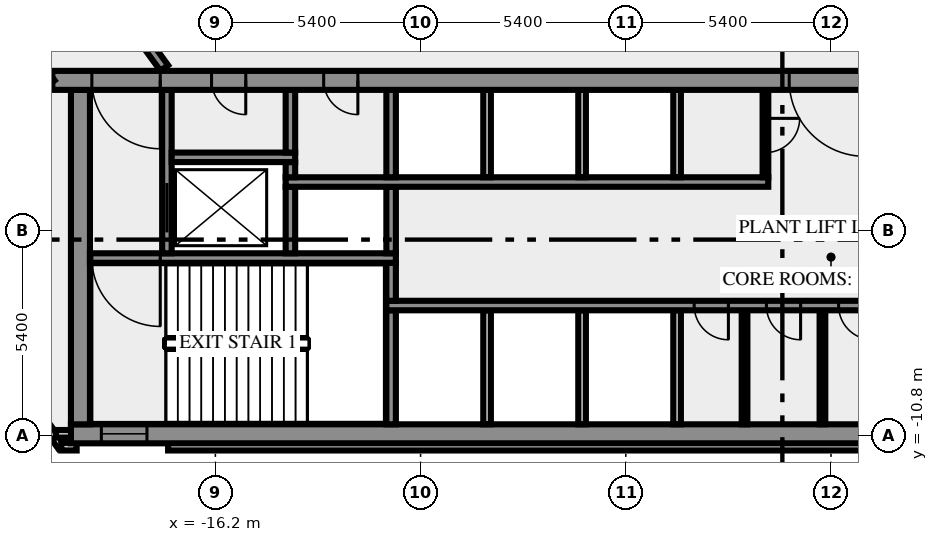
"""IFC4 building model, lengths in metres.
Left out: names, types, materials, properties, quantities, classifications, styles, units other than length and angle.
Written with IfcOpenShell. Run it as: python <this file> out.ifc"""

import sys

from ifc_helpers import new_model, si_unit, direction, frame, frame_2d, origin, place, context, subcontext, project, spatial, rectangle, extrude, element, fill, save


model = new_model("IFC4")
c1 = context("Model", 3, precision=1e-05, world=origin(), true_north=direction((0.0, 1.0)))
c2 = subcontext(c1, "Body", "Model", "MODEL_VIEW")
j1 = project(units=[si_unit("LENGTHUNIT", "METRE"), si_unit("PLANEANGLEUNIT", "RADIAN")], contexts=[c1])
p1 = place(None, origin())
s1 = spatial("IfcSite", under=j1, at=p1, CompositionType="ELEMENT")
p2 = place(p1, origin())
s2 = spatial("IfcBuilding", under=s1, at=p2, CompositionType="ELEMENT")
p3 = place(p2, frame((0.0, 0.0, 25.0)))
s3 = spatial("IfcBuildingStorey", under=s2, at=p3, CompositionType="ELEMENT", Elevation=25.0)
p4 = place(p3, frame((-21.833, -8.909, 0.0), z_axis=(0.0, 0.0, 1.0), x_axis=(0.587766567315, -0.809030569476, 0.0)))
e1 = element("IfcWall", 1, at=p4, inside=s3, PredefinedType="SOLIDWALL", context=c2, shape_type="SweptSolid", body=[
    extrude(rectangle(XDim=2.688, YDim=0.2, at=frame_2d((1.344, 0.0))), origin(), (0.0, 0.0, 1.0), 5.65),
])
p5 = place(p3, frame((-20.256, -11.088, 0.0), z_axis=(0.0, 0.0, 1.0), x_axis=(1.0, 0.0, 0.0)))
e2 = element("IfcWall", 2, at=p5, inside=s3, PredefinedType="SOLIDWALL", context=c2, shape_type="SweptSolid", body=[
    extrude(rectangle(XDim=0.406, YDim=0.2, at=frame_2d((0.203, 0.0))), origin(), (0.0, 0.0, 1.0), 5.65),
])
p6 = place(p3, frame((-17.444, -11.088, 0.0), z_axis=(0.0, 0.0, 1.0), x_axis=(1.0, 0.0, 0.0)))
e3 = element("IfcWall", 3, at=p6, inside=s3, PredefinedType="SOLIDWALL", context=c2, shape_type="SweptSolid", body=[
    extrude(rectangle(XDim=34.888, YDim=0.2, at=frame_2d((17.444, 0.0))), origin(), (0.0, 0.0, 1.0), 5.65),
])
p7 = place(p3, frame((-19.98, -10.75, 0.0), z_axis=(0.0, 0.0, 1.0), x_axis=(-1.0, 0.0, 0.0)))
e4 = element("IfcWall", 4, at=p7, inside=s3, PredefinedType="SOLIDWALL", context=c2, shape_type="SweptSolid", body=[
    extrude(rectangle(XDim=0.417, YDim=0.2, at=frame_2d((0.208, 0.0))), origin(), (0.0, 0.0, 1.0), 5.65),
])
p8 = place(p3, frame((-20.0, -10.75, 0.0), z_axis=(0.0, 0.0, 1.0), x_axis=(1.0, 0.0, 0.0)))
e5 = element("IfcWall", 5, at=p8, inside=s3, PredefinedType="SHEAR", context=c2, shape_type="SweptSolid", body=[
    extrude(rectangle(XDim=40.0, YDim=0.5, at=frame_2d((20.0, 0.0))), origin(), (0.0, 0.0, 1.0), 5.65),
])
p9 = place(p8, frame((0.8, 0.0, 1.0)))
e6 = element("IfcOpeningElement", 6, at=p9, cuts=e5, PredefinedType="OPENING", context=c2, shape_type="SweptSolid", body=[
    extrude(rectangle(XDim=1.2, YDim=1.2, at=frame_2d((0.6, 0.6))), frame((0.0, 0.26, 0.0), z_axis=(0.0, -1.0, 0.0), x_axis=(1.0, 0.0, 0.0)), (0.0, 0.0, 1.0), 0.52),
])
p10 = place(p8, frame((38.0, 0.0, 1.0)))
e7 = element("IfcOpeningElement", 7, at=p10, cuts=e5, PredefinedType="OPENING", context=c2, shape_type="SweptSolid", body=[
    extrude(rectangle(XDim=1.2, YDim=1.2, at=frame_2d((0.6, 0.6))), frame((0.0, 0.26, 0.0), z_axis=(0.0, -1.0, 0.0), x_axis=(1.0, 0.0, 0.0)), (0.0, 0.0, 1.0), 0.52),
])
p11 = place(p3, frame((-19.75, -10.5, 0.0), z_axis=(0.0, 0.0, 1.0), x_axis=(0.0, 1.0, 0.0)))
e8 = element("IfcWall", 8, at=p11, inside=s3, PredefinedType="SHEAR", context=c2, shape_type="SweptSolid", body=[
    extrude(rectangle(XDim=8.8, YDim=0.5, at=frame_2d((4.4, 0.0))), origin(), (0.0, 0.0, 1.0), 5.65),
])
p12 = place(p3, frame((-11.575, -10.5, 0.0), z_axis=(0.0, 0.0, 1.0), x_axis=(0.0, 1.0, 0.0)))
e9 = element("IfcWall", 9, at=p12, inside=s3, PredefinedType="SHEAR", context=c2, shape_type="SweptSolid", body=[
    extrude(rectangle(XDim=3.0, YDim=0.25, at=frame_2d((1.5, 0.0))), origin(), (0.0, 0.0, 1.0), 5.65),
])
for number, where, z_axis, x_axis in (
    (10, (-9.05, -10.5, 0.0), (0.0, 0.0, 1.0), (0.0, 1.0, 0.0)),
    (11, (-6.55, -10.5, 0.0), (0.0, 0.0, 1.0), (0.0, 1.0, 0.0)),
    (12, (-4.05, -10.5, 0.0), (0.0, 0.0, 1.0), (0.0, 1.0, 0.0)),
):
    element("IfcWall", number, at=place(p3, frame(where, z_axis=z_axis, x_axis=x_axis)), inside=s3, PredefinedType="SOLIDWALL", context=c2, shape_type="SweptSolid", body=[
        extrude(rectangle(XDim=3.0, YDim=0.2, at=frame_2d((1.5, 0.0))), origin(), (0.0, 0.0, 1.0), 5.65),
    ])
for number, where, z_axis, x_axis in (
    (13, (-2.275, -10.5, 0.0), (0.0, 0.0, 1.0), (0.0, 1.0, 0.0)),
    (14, (-0.225, -10.5, 0.0), (0.0, 0.0, 1.0), (0.0, 1.0, 0.0)),
):
    element("IfcWall", number, at=place(p3, frame(where, z_axis=z_axis, x_axis=x_axis)), inside=s3, PredefinedType="PARTITIONING", context=c2, shape_type="SweptSolid", body=[
        extrude(rectangle(XDim=3.0, YDim=0.15, at=frame_2d((1.5, 0.0))), origin(), (0.0, 0.0, 1.0), 5.65),
    ])
p13 = place(p3, frame((11.7, -7.375, 0.0), z_axis=(0.0, 0.0, 1.0), x_axis=(-1.0, 0.0, 0.0)))
e15 = element("IfcWall", 15, at=p13, inside=s3, PredefinedType="SHEAR", context=c2, shape_type="SweptSolid", body=[
    extrude(rectangle(XDim=23.4, YDim=0.25, at=frame_2d((11.7, 0.0))), origin(), (0.0, 0.0, 1.0), 5.65),
])
p14 = place(p13, frame((14.4, 0.0, 0.0)))
e16 = element("IfcOpeningElement", 16, at=p14, cuts=e15, PredefinedType="OPENING", context=c2, shape_type="SweptSolid", body=[
    extrude(rectangle(XDim=0.9, YDim=2.1, at=frame_2d((0.45, 1.05))), frame((0.0, 0.135, 0.0), z_axis=(0.0, -1.0, 0.0), x_axis=(1.0, 0.0, 0.0)), (0.0, 0.0, 1.0), 0.27),
])
p15 = place(p13, frame((12.5, 0.0, 0.0)))
e17 = element("IfcOpeningElement", 17, at=p15, cuts=e15, PredefinedType="OPENING", context=c2, shape_type="SweptSolid", body=[
    extrude(rectangle(XDim=0.9, YDim=2.1, at=frame_2d((0.45, 1.05))), frame((0.0, 0.135, 0.0), z_axis=(0.0, -1.0, 0.0), x_axis=(1.0, 0.0, 0.0)), (0.0, 0.0, 1.0), 0.27),
])
p16 = place(p13, frame((10.6, 0.0, 0.0)))
e18 = element("IfcOpeningElement", 18, at=p16, cuts=e15, PredefinedType="OPENING", context=c2, shape_type="SweptSolid", body=[
    extrude(rectangle(XDim=0.9, YDim=2.1, at=frame_2d((0.45, 1.05))), frame((0.0, 0.135, 0.0), z_axis=(0.0, -1.0, 0.0), x_axis=(1.0, 0.0, 0.0)), (0.0, 0.0, 1.0), 0.27),
])
p17 = place(p3, frame((-11.575, -7.25, 0.0), z_axis=(0.0, 0.0, 1.0), x_axis=(0.0, 1.0, 0.0)))
e19 = element("IfcWall", 19, at=p17, inside=s3, PredefinedType="SHEAR", context=c2, shape_type="SweptSolid", body=[
    extrude(rectangle(XDim=1.0, YDim=0.25, at=frame_2d((0.5, 0.0))), origin(), (0.0, 0.0, 1.0), 5.65),
])
p18 = place(p3, frame((-11.45, -6.125, 0.0), z_axis=(0.0, 0.0, 1.0), x_axis=(-1.0, 0.0, 0.0)))
e20 = element("IfcWall", 20, at=p18, inside=s3, PredefinedType="SHEAR", context=c2, shape_type="SweptSolid", body=[
    extrude(rectangle(XDim=8.05, YDim=0.25, at=frame_2d((4.025, 0.0))), origin(), (0.0, 0.0, 1.0), 5.65),
])
p19 = place(p18, frame((6.2, 0.0, 0.0)))
e21 = element("IfcOpeningElement", 21, at=p19, cuts=e20, PredefinedType="OPENING", context=c2, shape_type="SweptSolid", body=[
    extrude(rectangle(XDim=1.8, YDim=2.1, at=frame_2d((0.9, 1.05))), frame((0.0, 0.135, 0.0), z_axis=(0.0, -1.0, 0.0), x_axis=(1.0, 0.0, 0.0)), (0.0, 0.0, 1.0), 0.27),
])
p20 = place(p3, frame((-17.475, -6.0, 0.0), z_axis=(0.0, 0.0, 1.0), x_axis=(0.0, 1.0, 0.0)))
e22 = element("IfcWall", 22, at=p20, inside=s3, PredefinedType="SHEAR", context=c2, shape_type="SweptSolid", body=[
    extrude(rectangle(XDim=4.3, YDim=0.25, at=frame_2d((2.15, 0.0))), origin(), (0.0, 0.0, 1.0), 5.65),
])
p21 = place(p20, frame((0.55, 0.0, 0.0)))
e23 = element("IfcOpeningElement", 23, at=p21, cuts=e22, PredefinedType="OPENING", context=c2, shape_type="SweptSolid", body=[
    extrude(rectangle(XDim=1.3, YDim=2.1, at=frame_2d((0.65, 1.05))), frame((0.0, 0.135, 0.0), z_axis=(0.0, -1.0, 0.0), x_axis=(1.0, 0.0, 0.0)), (0.0, 0.0, 1.0), 0.27),
])
for number, where, z_axis, x_axis in (
    (24, (-14.225, -6.0, 0.0), (0.0, 0.0, 1.0), (0.0, 1.0, 0.0)),
    (25, (-11.575, -6.0, 0.0), (0.0, 0.0, 1.0), (0.0, 1.0, 0.0)),
):
    element("IfcWall", number, at=place(p3, frame(where, z_axis=z_axis, x_axis=x_axis)), inside=s3, PredefinedType="SHEAR", context=c2, shape_type="SweptSolid", body=[
        extrude(rectangle(XDim=1.75, YDim=0.25, at=frame_2d((0.875, 0.0))), origin(), (0.0, 0.0, 1.0), 5.65),
    ])
p22 = place(p3, frame((-14.35, -4.125, 0.0), z_axis=(0.0, 0.0, 1.0), x_axis=(1.0, 0.0, 0.0)))
e26 = element("IfcWall", 26, at=p22, inside=s3, PredefinedType="SHEAR", context=c2, shape_type="SweptSolid", body=[
    extrude(rectangle(XDim=12.7, YDim=0.25, at=frame_2d((6.35, 0.0))), origin(), (0.0, 0.0, 1.0), 5.65),
])
p23 = place(p3, frame((-14.225, -4.0, 0.0), z_axis=(0.0, 0.0, 1.0), x_axis=(0.0, 1.0, 0.0)))
e27 = element("IfcWall", 27, at=p23, inside=s3, PredefinedType="SHEAR", context=c2, shape_type="SweptSolid", body=[
    extrude(rectangle(XDim=0.4, YDim=0.25, at=frame_2d((0.2, 0.0))), origin(), (0.0, 0.0, 1.0), 5.65),
])
p24 = place(p3, frame((-11.575, -4.0, 0.0), z_axis=(0.0, 0.0, 1.0), x_axis=(0.0, 1.0, 0.0)))
e28 = element("IfcWall", 28, at=p24, inside=s3, PredefinedType="SHEAR", context=c2, shape_type="SweptSolid", body=[
    extrude(rectangle(XDim=2.3, YDim=0.25, at=frame_2d((1.15, 0.0))), origin(), (0.0, 0.0, 1.0), 5.65),
])
for number, where, z_axis, x_axis in (
    (29, (-9.05, -4.0, 0.0), (0.0, 0.0, 1.0), (0.0, 1.0, 0.0)),
    (30, (-6.55, -4.0, 0.0), (0.0, 0.0, 1.0), (0.0, 1.0, 0.0)),
    (31, (-4.05, -4.0, 0.0), (0.0, 0.0, 1.0), (0.0, 1.0, 0.0)),
):
    element("IfcWall", number, at=place(p3, frame(where, z_axis=z_axis, x_axis=x_axis)), inside=s3, PredefinedType="SOLIDWALL", context=c2, shape_type="SweptSolid", body=[
        extrude(rectangle(XDim=2.3, YDim=0.2, at=frame_2d((1.15, 0.0))), origin(), (0.0, 0.0, 1.0), 5.65),
    ])
p25 = place(p3, frame((-1.725, -1.7, 0.0), z_axis=(0.0, 0.0, 1.0), x_axis=(0.0, -1.0, 0.0)))
e32 = element("IfcWall", 32, at=p25, inside=s3, PredefinedType="PARTITIONING", context=c2, shape_type="SweptSolid", body=[
    extrude(rectangle(XDim=2.3, YDim=0.15, at=frame_2d((1.15, 0.0))), origin(), (0.0, 0.0, 1.0), 5.65),
])
p26 = place(p25, frame((0.75, 0.0, 0.0)))
e33 = element("IfcOpeningElement", 33, at=p26, cuts=e32, PredefinedType="OPENING", context=c2, shape_type="SweptSolid", body=[
    extrude(rectangle(XDim=0.9, YDim=2.1, at=frame_2d((0.45, 1.05))), frame((0.0, 0.085, 0.0), z_axis=(0.0, -1.0, 0.0), x_axis=(1.0, 0.0, 0.0)), (0.0, 0.0, 1.0), 0.17),
])
p27 = place(p3, frame((-17.35, -3.475, 0.0), z_axis=(0.0, 0.0, 1.0), x_axis=(1.0, 0.0, 0.0)))
e34 = element("IfcWall", 34, at=p27, inside=s3, PredefinedType="SHEAR", context=c2, shape_type="SweptSolid", body=[
    extrude(rectangle(XDim=3.25, YDim=0.25, at=frame_2d((1.625, 0.0))), origin(), (0.0, 0.0, 1.0), 5.65),
])
p28 = place(p3, frame((-14.225, -3.35, 0.0), z_axis=(0.0, 0.0, 1.0), x_axis=(0.0, 1.0, 0.0)))
e35 = element("IfcWall", 35, at=p28, inside=s3, PredefinedType="SHEAR", context=c2, shape_type="SweptSolid", body=[
    extrude(rectangle(XDim=1.65, YDim=0.25, at=frame_2d((0.825, 0.0))), origin(), (0.0, 0.0, 1.0), 5.65),
])
p29 = place(p3, frame((20.49, -1.45, 0.0), z_axis=(0.0, 0.0, 1.0), x_axis=(-1.0, 0.0, 0.0)))
e36 = element("IfcWall", 36, at=p29, inside=s3, PredefinedType="SHEAR", context=c2, shape_type="SweptSolid", body=[
    extrude(rectangle(XDim=40.98, YDim=0.5, at=frame_2d((20.49, 0.0))), origin(), (0.0, 0.0, 1.0), 5.65),
])
p30 = place(p29, frame((38.14, 0.0, 0.0)))
e37 = element("IfcOpeningElement", 37, at=p30, cuts=e36, PredefinedType="OPENING", context=c2, shape_type="SweptSolid", body=[
    extrude(rectangle(XDim=1.8, YDim=2.1, at=frame_2d((0.9, 1.05))), frame((0.0, 0.26, 0.0), z_axis=(0.0, -1.0, 0.0), x_axis=(1.0, 0.0, 0.0)), (0.0, 0.0, 1.0), 0.52),
])
p31 = place(p29, frame((35.89, 0.0, 0.0)))
e38 = element("IfcOpeningElement", 38, at=p31, cuts=e36, PredefinedType="OPENING", context=c2, shape_type="SweptSolid", body=[
    extrude(rectangle(XDim=0.9, YDim=2.1, at=frame_2d((0.45, 1.05))), frame((0.0, 0.26, 0.0), z_axis=(0.0, -1.0, 0.0), x_axis=(1.0, 0.0, 0.0)), (0.0, 0.0, 1.0), 0.52),
])
p32 = place(p29, frame((32.94, 0.0, 0.0)))
e39 = element("IfcOpeningElement", 39, at=p32, cuts=e36, PredefinedType="OPENING", context=c2, shape_type="SweptSolid", body=[
    extrude(rectangle(XDim=0.9, YDim=2.1, at=frame_2d((0.45, 1.05))), frame((0.0, 0.26, 0.0), z_axis=(0.0, -1.0, 0.0), x_axis=(1.0, 0.0, 0.0)), (0.0, 0.0, 1.0), 0.52),
])
p33 = place(p29, frame((19.59, 0.0, 0.0)))
e40 = element("IfcOpeningElement", 40, at=p33, cuts=e36, PredefinedType="OPENING", context=c2, shape_type="SweptSolid", body=[
    extrude(rectangle(XDim=2.0, YDim=2.1, at=frame_2d((1.0, 1.05))), frame((0.0, 0.26, 0.0), z_axis=(0.0, -1.0, 0.0), x_axis=(1.0, 0.0, 0.0)), (0.0, 0.0, 1.0), 0.52),
])
p34 = place(p29, frame((7.14, 0.0, 0.0)))
e41 = element("IfcOpeningElement", 41, at=p34, cuts=e36, PredefinedType="OPENING", context=c2, shape_type="SweptSolid", body=[
    extrude(rectangle(XDim=0.9, YDim=2.1, at=frame_2d((0.45, 1.05))), frame((0.0, 0.26, 0.0), z_axis=(0.0, -1.0, 0.0), x_axis=(1.0, 0.0, 0.0)), (0.0, 0.0, 1.0), 0.52),
])
p35 = place(p29, frame((5.028, 0.0, 0.0)))
e42 = element("IfcOpeningElement", 42, at=p35, cuts=e36, PredefinedType="OPENING", context=c2, shape_type="SweptSolid", body=[
    extrude(rectangle(XDim=0.8, YDim=2.1, at=frame_2d((0.4, 1.05))), frame((0.0, 0.26, 0.0), z_axis=(0.0, -1.0, 0.0), x_axis=(1.0, 0.0, 0.0)), (0.0, 0.0, 1.0), 0.52),
])
p36 = place(p29, frame((3.452, 0.0, 0.0)))
e43 = element("IfcOpeningElement", 43, at=p36, cuts=e36, PredefinedType="OPENING", context=c2, shape_type="SweptSolid", body=[
    extrude(rectangle(XDim=0.8, YDim=2.1, at=frame_2d((0.4, 1.05))), frame((0.0, 0.26, 0.0), z_axis=(0.0, -1.0, 0.0), x_axis=(1.0, 0.0, 0.0)), (0.0, 0.0, 1.0), 0.52),
])
p37 = place(p29, frame((1.04, 0.0, 0.0)))
e44 = element("IfcOpeningElement", 44, at=p37, cuts=e36, PredefinedType="OPENING", context=c2, shape_type="SweptSolid", body=[
    extrude(rectangle(XDim=1.8, YDim=2.1, at=frame_2d((0.9, 1.05))), frame((0.0, 0.26, 0.0), z_axis=(0.0, -1.0, 0.0), x_axis=(1.0, 0.0, 0.0)), (0.0, 0.0, 1.0), 0.52),
])
p38 = place(p3, frame((-20.531, -1.523, 0.0), z_axis=(0.0, 0.0, 1.0), x_axis=(-0.587785385475, 0.809016897612, 0.0)))
e45 = element("IfcWall", 45, at=p38, inside=s3, PredefinedType="SOLIDWALL", context=c2, shape_type="SweptSolid", body=[
    extrude(rectangle(XDim=50.212, YDim=0.25, at=frame_2d((25.106, 0.0))), origin(), (0.0, 0.0, 1.0), 5.65),
])
p39 = place(p38, frame((47.87, 0.0, 0.0)))
e46 = element("IfcOpeningElement", 46, at=p39, cuts=e45, PredefinedType="OPENING", context=c2, shape_type="SweptSolid", body=[
    extrude(rectangle(XDim=1.2, YDim=2.1, at=frame_2d((0.6, 1.05))), frame((0.0, 0.135, 0.0), z_axis=(0.0, -1.0, 0.0), x_axis=(1.0, 0.0, 0.0)), (0.0, 0.0, 1.0), 0.27),
])
p40 = place(p38, frame((20.765, 0.0, 0.0)))
e47 = element("IfcOpeningElement", 47, at=p40, cuts=e45, PredefinedType="OPENING", context=c2, shape_type="SweptSolid", body=[
    extrude(rectangle(XDim=1.2, YDim=2.1, at=frame_2d((0.6, 1.05))), frame((0.0, 0.135, 0.0), z_axis=(0.0, -1.0, 0.0), x_axis=(1.0, 0.0, 0.0)), (0.0, 0.0, 1.0), 0.27),
])
p41 = place(p38, frame((15.366, 0.0, 0.0)))
e48 = element("IfcOpeningElement", 48, at=p41, cuts=e45, PredefinedType="OPENING", context=c2, shape_type="SweptSolid", body=[
    extrude(rectangle(XDim=1.2, YDim=2.1, at=frame_2d((0.6, 1.05))), frame((0.0, 0.135, 0.0), z_axis=(0.0, -1.0, 0.0), x_axis=(1.0, 0.0, 0.0)), (0.0, 0.0, 1.0), 0.27),
])
p42 = place(p38, frame((22.667, 0.0, 0.0)))
e49 = element("IfcOpeningElement", 49, at=p42, cuts=e45, PredefinedType="OPENING", context=c2, shape_type="SweptSolid", body=[
    extrude(rectangle(XDim=1.0, YDim=2.1, at=frame_2d((0.5, 1.05))), frame((0.0, 0.135, 0.0), z_axis=(0.0, -1.0, 0.0), x_axis=(1.0, 0.0, 0.0)), (0.0, 0.0, 1.0), 0.27),
])
p43 = place(p38, frame((0.533, 0.0, 0.0)))
e50 = element("IfcOpeningElement", 50, at=p43, cuts=e45, PredefinedType="OPENING", context=c2, shape_type="SweptSolid", body=[
    extrude(rectangle(XDim=1.0, YDim=2.1, at=frame_2d((0.5, 1.05))), frame((0.0, 0.135, 0.0), z_axis=(0.0, -1.0, 0.0), x_axis=(1.0, 0.0, 0.0)), (0.0, 0.0, 1.0), 0.27),
])
p44 = place(p3, frame((-37.232, 25.972, 0.0), z_axis=(0.0, 0.0, 1.0), x_axis=(0.587786323093, -0.809016216391, 0.0)))
e51 = element("IfcWall", 51, at=p44, inside=s3, PredefinedType="SOLIDWALL", context=c2, shape_type="SweptSolid", body=[
    extrude(rectangle(XDim=33.493, YDim=0.25, at=frame_2d((16.747, 0.0))), origin(), (0.0, 0.0, 1.0), 5.65),
])
p45 = place(p44, frame((4.285, 0.0, 0.0)))
e52 = element("IfcOpeningElement", 52, at=p45, cuts=e51, PredefinedType="OPENING", context=c2, shape_type="SweptSolid", body=[
    extrude(rectangle(XDim=1.2, YDim=2.1, at=frame_2d((0.6, 1.05))), frame((0.0, 0.135, 0.0), z_axis=(0.0, -1.0, 0.0), x_axis=(1.0, 0.0, 0.0)), (0.0, 0.0, 1.0), 0.27),
])
p46 = place(p44, frame((0.34, 0.0, 0.0)))
e53 = element("IfcOpeningElement", 53, at=p46, cuts=e51, PredefinedType="OPENING", context=c2, shape_type="SweptSolid", body=[
    extrude(rectangle(XDim=0.9, YDim=2.1, at=frame_2d((0.45, 1.05))), frame((0.0, 0.135, 0.0), z_axis=(0.0, -1.0, 0.0), x_axis=(1.0, 0.0, 0.0)), (0.0, 0.0, 1.0), 0.27),
])
p47 = place(p9, origin())
e54 = element("IfcWindow", 54, at=p47, inside=s3, PartitioningType="SINGLE_PANEL", PredefinedType="WINDOW", context=c2, shape_type="SweptSolid", body=[
    extrude(rectangle(XDim=1.2, YDim=1.2, at=frame_2d((0.6, 0.6))), frame((0.0, 0.03, 0.0), z_axis=(0.0, -1.0, 0.0), x_axis=(1.0, 0.0, 0.0)), (0.0, 0.0, 1.0), 0.06),
])
fill(e6, e54)
p48 = place(p14, origin())
e55 = element("IfcDoor", 55, at=p48, inside=s3, OperationType="SINGLE_SWING_RIGHT", PredefinedType="DOOR", context=c2, shape_type="SweptSolid", body=[
    extrude(rectangle(XDim=0.9, YDim=2.1, at=frame_2d((0.45, 1.05))), frame((0.0, 0.025, 0.0), z_axis=(0.0, -1.0, 0.0), x_axis=(1.0, 0.0, 0.0)), (0.0, 0.0, 1.0), 0.05),
])
fill(e16, e55)
p49 = place(p15, origin())
e56 = element("IfcDoor", 56, at=p49, inside=s3, OperationType="SINGLE_SWING_RIGHT", PredefinedType="DOOR", context=c2, shape_type="SweptSolid", body=[
    extrude(rectangle(XDim=0.9, YDim=2.1, at=frame_2d((0.45, 1.05))), frame((0.0, 0.025, 0.0), z_axis=(0.0, -1.0, 0.0), x_axis=(1.0, 0.0, 0.0)), (0.0, 0.0, 1.0), 0.05),
])
fill(e17, e56)
p50 = place(p16, origin())
e57 = element("IfcDoor", 57, at=p50, inside=s3, OperationType="SINGLE_SWING_LEFT", PredefinedType="DOOR", context=c2, shape_type="SweptSolid", body=[
    extrude(rectangle(XDim=0.9, YDim=2.1, at=frame_2d((0.45, 1.05))), frame((0.0, 0.025, 0.0), z_axis=(0.0, -1.0, 0.0), x_axis=(1.0, 0.0, 0.0)), (0.0, 0.0, 1.0), 0.05),
])
fill(e18, e57)
p51 = place(p19, origin())
e58 = element("IfcDoor", 58, at=p51, inside=s3, OperationType="DOUBLE_DOOR_SINGLE_SWING", PredefinedType="DOOR", context=c2, shape_type="SweptSolid", body=[
    extrude(rectangle(XDim=1.8, YDim=2.1, at=frame_2d((0.9, 1.05))), frame((0.0, 0.025, 0.0), z_axis=(0.0, -1.0, 0.0), x_axis=(1.0, 0.0, 0.0)), (0.0, 0.0, 1.0), 0.05),
])
fill(e21, e58)
p52 = place(p21, origin())
e59 = element("IfcDoor", 59, at=p52, inside=s3, OperationType="DOUBLE_DOOR_SLIDING", PredefinedType="DOOR", context=c2, shape_type="SweptSolid", body=[
    extrude(rectangle(XDim=1.3, YDim=2.1, at=frame_2d((0.65, 1.05))), frame((0.0, 0.025, 0.0), z_axis=(0.0, -1.0, 0.0), x_axis=(1.0, 0.0, 0.0)), (0.0, 0.0, 1.0), 0.05),
])
fill(e23, e59)
p53 = place(p26, origin())
e60 = element("IfcDoor", 60, at=p53, inside=s3, OperationType="SINGLE_SWING_RIGHT", PredefinedType="DOOR", context=c2, shape_type="SweptSolid", body=[
    extrude(rectangle(XDim=0.9, YDim=2.1, at=frame_2d((0.45, 1.05))), frame((0.0, 0.025, 0.0), z_axis=(0.0, -1.0, 0.0), x_axis=(1.0, 0.0, 0.0)), (0.0, 0.0, 1.0), 0.05),
])
fill(e33, e60)
p54 = place(p30, origin())
e61 = element("IfcDoor", 61, at=p54, inside=s3, OperationType="DOUBLE_DOOR_SINGLE_SWING", PredefinedType="DOOR", context=c2, shape_type="SweptSolid", body=[
    extrude(rectangle(XDim=1.8, YDim=2.1, at=frame_2d((0.9, 1.05))), frame((0.0, 0.025, 0.0), z_axis=(0.0, -1.0, 0.0), x_axis=(1.0, 0.0, 0.0)), (0.0, 0.0, 1.0), 0.05),
])
fill(e37, e61)
p55 = place(p31, origin())
e62 = element("IfcDoor", 62, at=p55, inside=s3, OperationType="SINGLE_SWING_RIGHT", PredefinedType="DOOR", context=c2, shape_type="SweptSolid", body=[
    extrude(rectangle(XDim=0.9, YDim=2.1, at=frame_2d((0.45, 1.05))), frame((0.0, 0.025, 0.0), z_axis=(0.0, -1.0, 0.0), x_axis=(1.0, 0.0, 0.0)), (0.0, 0.0, 1.0), 0.05),
])
fill(e38, e62)
p56 = place(p32, origin())
e63 = element("IfcDoor", 63, at=p56, inside=s3, OperationType="SINGLE_SWING_RIGHT", PredefinedType="DOOR", context=c2, shape_type="SweptSolid", body=[
    extrude(rectangle(XDim=0.9, YDim=2.1, at=frame_2d((0.45, 1.05))), frame((0.0, 0.025, 0.0), z_axis=(0.0, -1.0, 0.0), x_axis=(1.0, 0.0, 0.0)), (0.0, 0.0, 1.0), 0.05),
])
fill(e39, e63)
p57 = place(p33, origin())
e64 = element("IfcDoor", 64, at=p57, inside=s3, OperationType="DOUBLE_DOOR_SINGLE_SWING", PredefinedType="DOOR", context=c2, shape_type="SweptSolid", body=[
    extrude(rectangle(XDim=2.0, YDim=2.1, at=frame_2d((1.0, 1.05))), frame((0.0, 0.025, 0.0), z_axis=(0.0, -1.0, 0.0), x_axis=(1.0, 0.0, 0.0)), (0.0, 0.0, 1.0), 0.05),
])
fill(e40, e64)
save(model, sys.argv[1])
